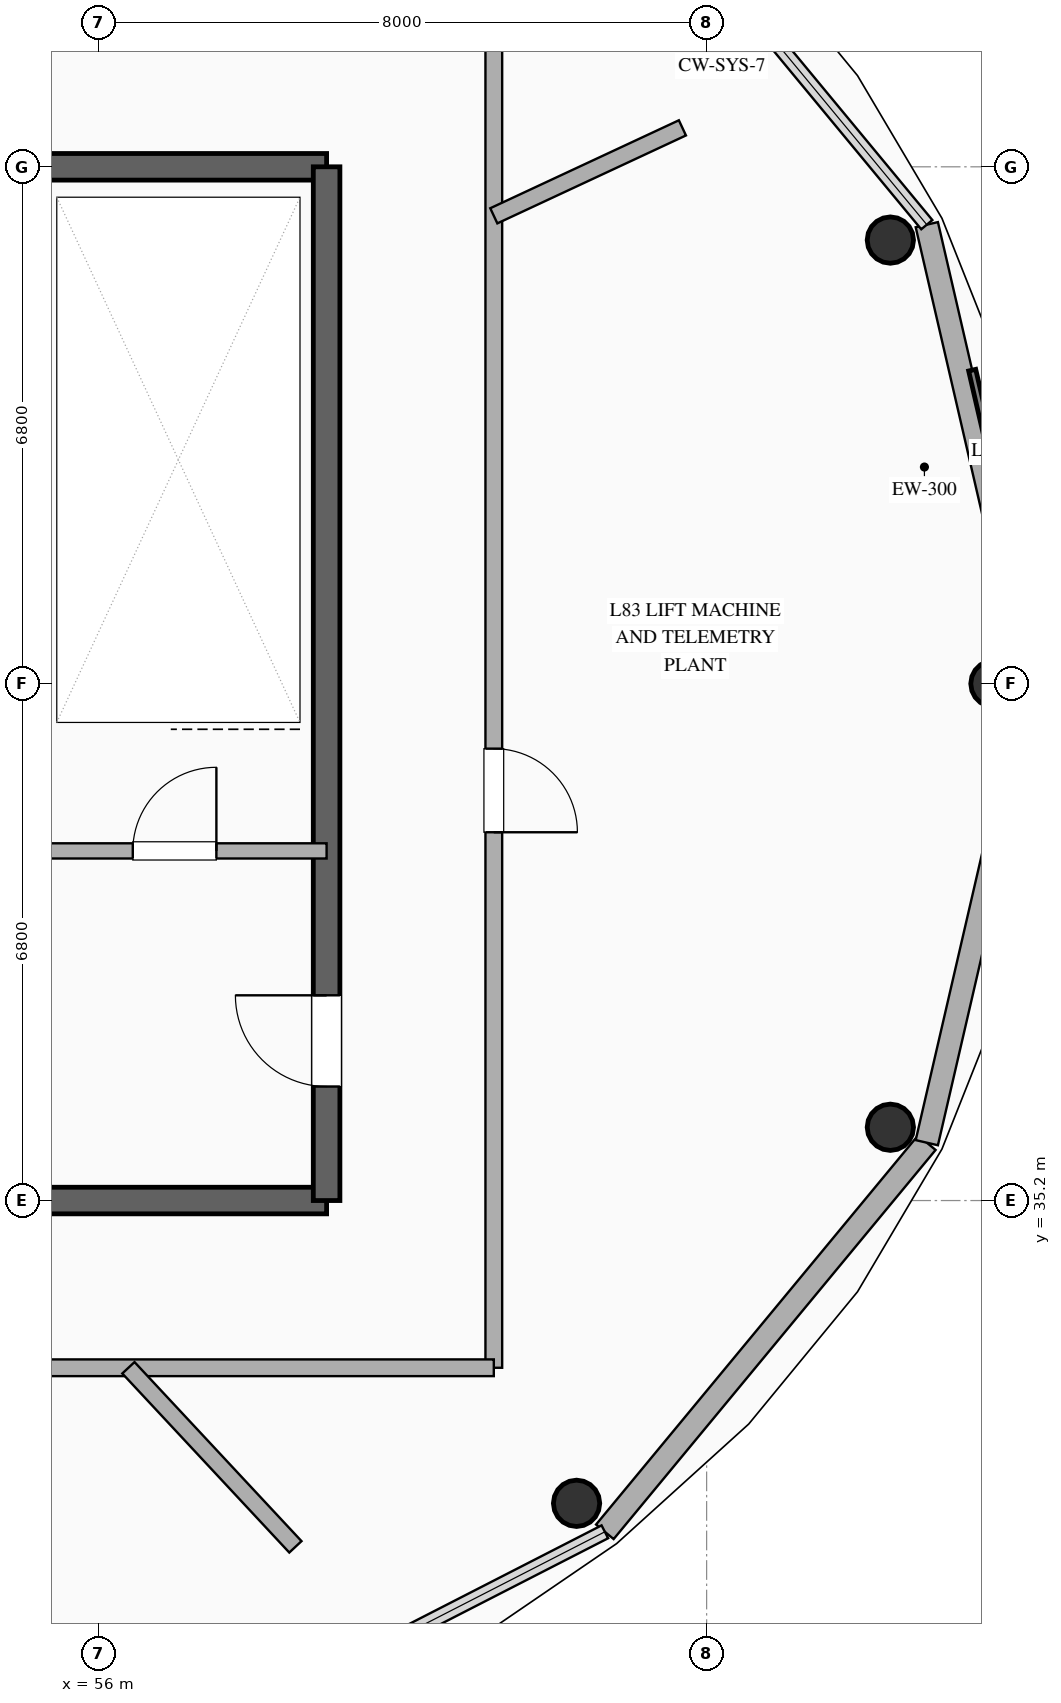
"""IFC4 building model, lengths in metres.
Left out: names, types, materials, properties, quantities, classifications, styles, units other than length and angle.
Written with IfcOpenShell. Run it as: python <this file> out.ifc"""

import sys

from ifc_helpers import new_model, si_unit, direction, frame, frame_2d, origin, origin_2d, place, context, subcontext, project, spatial, rectangle, hollow_circle, extrude, element, fill, save


model = new_model("IFC4")
c1 = context("Model", 3, precision=1e-05, world=origin(), true_north=direction((0.0, 1.0)))
c2 = subcontext(c1, "Body", "Model", "MODEL_VIEW")
j1 = project(units=[si_unit("LENGTHUNIT", "METRE"), si_unit("PLANEANGLEUNIT", "RADIAN")], contexts=[c1])
p1 = place(None, origin())
s1 = spatial("IfcSite", under=j1, at=p1, CompositionType="ELEMENT")
p2 = place(p1, origin())
s2 = spatial("IfcBuilding", under=s1, at=p2, CompositionType="ELEMENT")
p3 = place(p2, frame((0.0, 0.0, 321.6)))
s3 = spatial("IfcBuildingStorey", under=s2, at=p3, CompositionType="ELEMENT", Elevation=321.6)
for number, where, z_axis, x_axis in (
    (1, (55.0, 35.2, 0.0), (0.0, 0.0, 1.0), (1.0, 0.0, 0.0)),
    (2, (55.0, 48.8, 0.0), (0.0, 0.0, 1.0), (1.0, 0.0, 0.0)),
):
    element("IfcWall", number, at=place(p3, frame(where, z_axis=z_axis, x_axis=x_axis)), inside=s3, PredefinedType="SHEAR", context=c2, shape_type="SweptSolid", body=[
        extrude(rectangle(XDim=4.0, YDim=0.35, at=frame_2d((2.0, 0.0))), origin(), (0.0, 0.0, 1.0), 5.14),
    ])
p4 = place(p3, frame((59.0, 35.2, 0.0), z_axis=(0.0, 0.0, 1.0), x_axis=(0.0, 1.0, 0.0)))
e3 = element("IfcWall", 3, at=p4, inside=s3, PredefinedType="SHEAR", context=c2, shape_type="SweptSolid", body=[
    extrude(rectangle(XDim=13.6, YDim=0.35, at=frame_2d((6.8, 0.0))), origin(), (0.0, 0.0, 1.0), 5.14),
])
p5 = place(p4, frame((1.5, 0.0, 0.0)))
e4 = element("IfcOpeningElement", 4, at=p5, cuts=e3, PredefinedType="OPENING", context=c2, shape_type="SweptSolid", body=[
    extrude(rectangle(XDim=1.2, YDim=2.15, at=frame_2d((0.6, 1.075))), frame((0.0, 0.185, 0.0), z_axis=(0.0, -1.0, 0.0), x_axis=(1.0, 0.0, 0.0)), (0.0, 0.0, 1.0), 0.37),
])
for number, where, z_axis, x_axis in (
    (5, (67.78, 42.0, 0.0), (0.0, 0.0, 1.0), (1.0, 0.0, 0.0)),
    (6, (66.417, 47.836, 0.0), (0.0, 0.0, 1.0), (1.0, 0.0, 0.0)),
    (7, (62.289, 31.217, 0.0), (0.0, 0.0, 1.0), (1.0, 0.0, 0.0)),
    (8, (66.417, 36.164, 0.0), (0.0, 0.0, 1.0), (1.0, 0.0, 0.0)),
):
    element("IfcColumn", number, at=place(p3, frame(where, z_axis=z_axis, x_axis=x_axis)), inside=s3, PredefinedType="COLUMN", context=c2, shape_type="SweptSolid", body=[
        extrude(hollow_circle(Radius=0.305, WallThickness=0.02, at=origin_2d()), origin(), (0.0, 0.0, 1.0), 5.14),
    ])
p6 = place(p3, frame((68.295, 42.0, 0.0), z_axis=(0.0, 0.0, 1.0), x_axis=(-0.225604460723, 0.974218983238, 0.0)))
e9 = element("IfcWall", 9, at=p6, inside=s3, PredefinedType="SOLIDWALL", context=c2, shape_type="SweptSolid", body=[
    extrude(rectangle(XDim=6.199, YDim=0.3, at=frame_2d((3.099, 0.0))), origin(), (0.0, 0.0, 1.0), 5.14),
])
p7 = place(p3, frame((62.661, 30.842, 0.0), z_axis=(0.0, 0.0, 1.0), x_axis=(0.637488001771, 0.770460282947, 0.0)))
e10 = element("IfcWall", 10, at=p7, inside=s3, PredefinedType="SOLIDWALL", context=c2, shape_type="SweptSolid", body=[
    extrude(rectangle(XDim=6.645, YDim=0.3, at=frame_2d((3.322, 0.0))), origin(), (0.0, 0.0, 1.0), 5.14),
])
p8 = place(p3, frame((66.897, 35.961, 0.0), z_axis=(0.0, 0.0, 1.0), x_axis=(0.225604460723, 0.974218983238, 0.0)))
e11 = element("IfcWall", 11, at=p8, inside=s3, PredefinedType="SOLIDWALL", context=c2, shape_type="SweptSolid", body=[
    extrude(rectangle(XDim=6.199, YDim=0.3, at=frame_2d((3.099, 0.0))), origin(), (0.0, 0.0, 1.0), 5.14),
])
p9 = place(p3, frame((55.0, 39.8, 0.0), z_axis=(0.0, 0.0, 1.0), x_axis=(1.0, 0.0, 0.0)))
e12 = element("IfcWall", 12, at=p9, inside=s3, PredefinedType="SOLIDWALL", context=c2, shape_type="SweptSolid", body=[
    extrude(rectangle(XDim=4.0, YDim=0.2, at=frame_2d((2.0, 0.0))), origin(), (0.0, 0.0, 1.0), 3.74),
])
p10 = place(p9, frame((1.45, 0.0, 0.0)))
e13 = element("IfcOpeningElement", 13, at=p10, cuts=e12, PredefinedType="OPENING", context=c2, shape_type="SweptSolid", body=[
    extrude(rectangle(XDim=1.1, YDim=2.15, at=frame_2d((0.55, 1.075))), frame((0.0, 0.11, 0.0), z_axis=(0.0, -1.0, 0.0), x_axis=(1.0, 0.0, 0.0)), (0.0, 0.0, 1.0), 0.22),
])
p11 = place(p3, frame((61.2, 51.0, 0.0), z_axis=(0.0, 0.0, 1.0), x_axis=(0.0, -1.0, 0.0)))
e14 = element("IfcWall", 14, at=p11, inside=s3, PredefinedType="SOLIDWALL", context=c2, shape_type="SweptSolid", body=[
    extrude(rectangle(XDim=18.0, YDim=0.22, at=frame_2d((9.0, 0.0))), origin(), (0.0, 0.0, 1.0), 3.74),
])
p12 = place(p11, frame((9.855, 0.0, 0.0)))
e15 = element("IfcOpeningElement", 15, at=p12, cuts=e14, PredefinedType="OPENING", context=c2, shape_type="SweptSolid", body=[
    extrude(rectangle(XDim=1.1, YDim=2.15, at=frame_2d((0.55, 1.075))), frame((0.0, 0.12, 0.0), z_axis=(0.0, -1.0, 0.0), x_axis=(1.0, 0.0, 0.0)), (0.0, 0.0, 1.0), 0.24),
])
p13 = place(p3, frame((61.2, 33.0, 0.0), z_axis=(0.0, 0.0, 1.0), x_axis=(-1.0, 0.0, 0.0)))
e16 = element("IfcWall", 16, at=p13, inside=s3, PredefinedType="SOLIDWALL", context=c2, shape_type="SweptSolid", body=[
    extrude(rectangle(XDim=26.4, YDim=0.22, at=frame_2d((13.2, 0.0))), origin(), (0.0, 0.0, 1.0), 3.74),
])
p14 = place(p13, frame((10.945, 0.0, 0.0)))
e17 = element("IfcOpeningElement", 17, at=p14, cuts=e16, PredefinedType="OPENING", context=c2, shape_type="SweptSolid", body=[
    extrude(rectangle(XDim=1.1, YDim=2.15, at=frame_2d((0.55, 1.075))), frame((0.0, 0.12, 0.0), z_axis=(0.0, -1.0, 0.0), x_axis=(1.0, 0.0, 0.0)), (0.0, 0.0, 1.0), 0.24),
])
p15 = place(p3, frame((56.393, 33.0, 0.0), z_axis=(0.0, 0.0, 1.0), x_axis=(0.68200765992, -0.731345029251, 0.0)))
e18 = element("IfcWall", 18, at=p15, inside=s3, PredefinedType="SOLIDWALL", context=c2, shape_type="SweptSolid", body=[
    extrude(rectangle(XDim=3.221, YDim=0.22, at=frame_2d((1.611, 0.0))), origin(), (0.0, 0.0, 1.0), 3.74),
])
p16 = place(p3, frame((61.2, 48.155, 0.0), z_axis=(0.0, 0.0, 1.0), x_axis=(0.906292453065, 0.422651143991, 0.0)))
e19 = element("IfcWall", 19, at=p16, inside=s3, PredefinedType="SOLIDWALL", context=c2, shape_type="SweptSolid", body=[
    extrude(rectangle(XDim=2.738, YDim=0.22, at=frame_2d((1.369, 0.0))), origin(), (0.0, 0.0, 1.0), 3.74),
])
p17 = place(p5, origin())
e20 = element("IfcDoor", 20, at=p17, inside=s3, OperationType="SINGLE_SWING_RIGHT", PredefinedType="DOOR", context=c2, shape_type="SweptSolid", body=[
    extrude(rectangle(XDim=1.2, YDim=2.15, at=frame_2d((0.6, 1.075))), frame((0.0, 0.025, 0.0), z_axis=(0.0, -1.0, 0.0), x_axis=(1.0, 0.0, 0.0)), (0.0, 0.0, 1.0), 0.05),
])
fill(e4, e20)
p18 = place(p10, origin())
e21 = element("IfcDoor", 21, at=p18, inside=s3, OperationType="SINGLE_SWING_RIGHT", PredefinedType="DOOR", context=c2, shape_type="SweptSolid", body=[
    extrude(rectangle(XDim=1.1, YDim=2.15, at=frame_2d((0.55, 1.075))), frame((0.0, 0.025, 0.0), z_axis=(0.0, -1.0, 0.0), x_axis=(1.0, 0.0, 0.0)), (0.0, 0.0, 1.0), 0.05),
])
fill(e13, e21)
p19 = place(p12, origin())
e22 = element("IfcDoor", 22, at=p19, inside=s3, OperationType="SINGLE_SWING_RIGHT", PredefinedType="DOOR", context=c2, shape_type="SweptSolid", body=[
    extrude(rectangle(XDim=1.1, YDim=2.15, at=frame_2d((0.55, 1.075))), frame((0.0, 0.025, 0.0), z_axis=(0.0, -1.0, 0.0), x_axis=(1.0, 0.0, 0.0)), (0.0, 0.0, 1.0), 0.05),
])
fill(e15, e22)
save(model, sys.argv[1])
